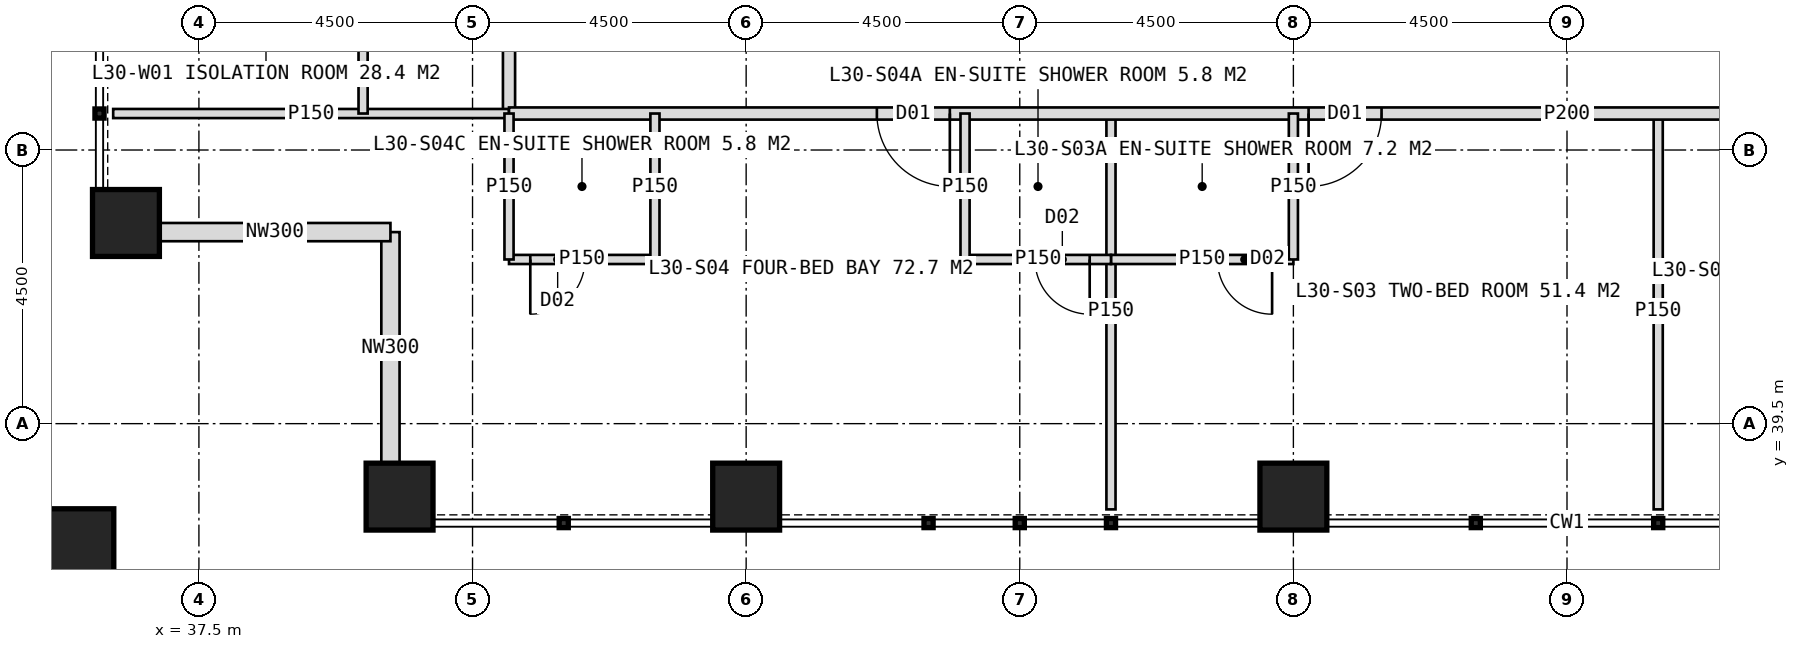
"""IFC4 building model, lengths in metres.
Left out: names, types, materials, properties, quantities, classifications, styles, units other than length and angle.
Written with IfcOpenShell. Run it as: python <this file> out.ifc"""

import sys

from ifc_helpers import new_model, si_unit, direction, frame, frame_2d, origin, origin_2d, place, context, subcontext, project, spatial, rectangle, hollow_rectangle, extrude, element, fill, save


model = new_model("IFC4")
c1 = context("Model", 3, precision=1e-05, world=origin(), true_north=direction((0.0, 1.0)))
c2 = subcontext(c1, "Body", "Model", "MODEL_VIEW")
j1 = project(units=[si_unit("LENGTHUNIT", "METRE"), si_unit("PLANEANGLEUNIT", "RADIAN")], contexts=[c1])
p1 = place(None, origin())
s1 = spatial("IfcSite", under=j1, at=p1, CompositionType="ELEMENT")
p2 = place(p1, origin())
s2 = spatial("IfcBuilding", under=s1, at=p2, CompositionType="ELEMENT")
p3 = place(p2, frame((0.0, 0.0, 128.0)))
s3 = spatial("IfcBuildingStorey", under=s2, at=p3, CompositionType="ELEMENT", Elevation=128.0)
for number, where, z_axis, x_axis in (
    (1, (40.8, 38.3, 0.0), (0.0, 0.0, 1.0), (1.0, 0.0, 0.0)),
    (2, (36.3, 42.8, 0.0), (0.0, 0.0, 1.0), (1.0, 0.0, 0.0)),
    (3, (46.5, 38.3, 0.0), (0.0, 0.0, 1.0), (1.0, 0.0, 0.0)),
    (4, (55.5, 38.3, 0.0), (0.0, 0.0, 1.0), (1.0, 0.0, 0.0)),
):
    element("IfcColumn", number, at=place(p3, frame(where, z_axis=z_axis, x_axis=x_axis)), inside=s3, PredefinedType="COLUMN", context=c2, shape_type="SweptSolid", body=[
        extrude(hollow_rectangle(XDim=1.1, YDim=1.1, WallThickness=0.1, at=origin_2d()), origin(), (0.0, 0.0, 1.0), 4.0),
    ])
p4 = place(p3, frame((35.4, 37.4, 0.0), z_axis=(0.0, 0.0, 1.0), x_axis=(1.0, 0.0, 0.0)))
e5 = element("IfcColumn", 5, at=p4, inside=s3, PredefinedType="COLUMN", context=c2, shape_type="SweptSolid", body=[
    extrude(hollow_rectangle(XDim=1.4, YDim=1.4, WallThickness=0.08, at=origin_2d()), origin(), (0.0, 0.0, 1.0), 4.0),
])
for number, where, z_axis, x_axis in (
    (6, (40.65, 38.85, 0.0), (0.0, 0.0, 1.0), (0.0, 1.0, 0.0)),
    (7, (40.65, 42.65, 0.0), (0.0, 0.0, 1.0), (-1.0, 0.0, 0.0)),
):
    element("IfcWall", number, at=place(p3, frame(where, z_axis=z_axis, x_axis=x_axis)), inside=s3, PredefinedType="ELEMENTEDWALL", context=c2, shape_type="SweptSolid", body=[
        extrude(rectangle(XDim=3.8, YDim=0.3, at=frame_2d((1.9, 0.0))), origin(), (0.0, 0.0, 1.0), 4.0),
    ])
p5 = place(p3, frame((42.6, 44.6, 0.0), z_axis=(0.0, 0.0, 1.0), x_axis=(0.0, 1.0, 0.0)))
e8 = element("IfcWall", 8, at=p5, inside=s3, PredefinedType="PARTITIONING", context=c2, shape_type="SweptSolid", body=[
    extrude(rectangle(XDim=34.8, YDim=0.2, at=frame_2d((17.4, 0.0))), origin(), (0.0, 0.0, 1.0), 3.75),
])
p6 = place(p5, frame((2.45, 0.0, 0.0)))
e9 = element("IfcOpeningElement", 9, at=p6, cuts=e8, PredefinedType="OPENING", context=c2, shape_type="SweptSolid", body=[
    extrude(rectangle(XDim=1.2, YDim=2.2, at=frame_2d((0.6, 1.1))), frame((0.0, 0.11, 0.0), z_axis=(0.0, -1.0, 0.0), x_axis=(1.0, 0.0, 0.0)), (0.0, 0.0, 1.0), 0.22),
])
p7 = place(p5, frame((10.15, 0.0, 0.0)))
e10 = element("IfcOpeningElement", 10, at=p7, cuts=e8, PredefinedType="OPENING", context=c2, shape_type="SweptSolid", body=[
    extrude(rectangle(XDim=1.2, YDim=2.2, at=frame_2d((0.6, 1.1))), frame((0.0, 0.11, 0.0), z_axis=(0.0, -1.0, 0.0), x_axis=(1.0, 0.0, 0.0)), (0.0, 0.0, 1.0), 0.22),
])
p8 = place(p5, frame((23.45, 0.0, 0.0)))
e11 = element("IfcOpeningElement", 11, at=p8, cuts=e8, PredefinedType="OPENING", context=c2, shape_type="SweptSolid", body=[
    extrude(rectangle(XDim=1.2, YDim=2.2, at=frame_2d((0.6, 1.1))), frame((0.0, 0.11, 0.0), z_axis=(0.0, -1.0, 0.0), x_axis=(1.0, 0.0, 0.0)), (0.0, 0.0, 1.0), 0.22),
])
p9 = place(p5, frame((30.55, 0.0, 0.0)))
e12 = element("IfcOpeningElement", 12, at=p9, cuts=e8, PredefinedType="OPENING", context=c2, shape_type="SweptSolid", body=[
    extrude(rectangle(XDim=1.2, YDim=2.2, at=frame_2d((0.6, 1.1))), frame((0.0, 0.11, 0.0), z_axis=(0.0, -1.0, 0.0), x_axis=(1.0, 0.0, 0.0)), (0.0, 0.0, 1.0), 0.22),
])
p10 = place(p3, frame((42.6, 44.6, 0.0), z_axis=(0.0, 0.0, 1.0), x_axis=(-1.0, 0.0, 0.0)))
e13 = element("IfcWall", 13, at=p10, inside=s3, PredefinedType="PARTITIONING", context=c2, shape_type="SweptSolid", body=[
    extrude(rectangle(XDim=6.51, YDim=0.15, at=frame_2d((3.255, 0.0))), origin(), (0.0, 0.0, 1.0), 3.75),
])
p11 = place(p3, frame((40.2, 44.6, 0.0), z_axis=(0.0, 0.0, 1.0), x_axis=(0.0, 1.0, 0.0)))
e14 = element("IfcWall", 14, at=p11, inside=s3, PredefinedType="PARTITIONING", context=c2, shape_type="SweptSolid", body=[
    extrude(rectangle(XDim=3.9, YDim=0.15, at=frame_2d((1.95, 0.0))), origin(), (0.0, 0.0, 1.0), 3.75),
])
p12 = place(p11, frame((2.45, 0.0, 0.0)))
e15 = element("IfcOpeningElement", 15, at=p12, cuts=e14, PredefinedType="OPENING", context=c2, shape_type="SweptSolid", body=[
    extrude(rectangle(XDim=1.2, YDim=2.2, at=frame_2d((0.6, 1.1))), frame((0.0, 0.085, 0.0), z_axis=(0.0, -1.0, 0.0), x_axis=(1.0, 0.0, 0.0)), (0.0, 0.0, 1.0), 0.17),
])
for number, where, z_axis, x_axis in (
    (16, (61.5, 44.6, 0.0), (0.0, 0.0, 1.0), (0.0, -1.0, 0.0)),
    (17, (52.5, 44.6, 0.0), (0.0, 0.0, 1.0), (0.0, -1.0, 0.0)),
):
    element("IfcWall", number, at=place(p3, frame(where, z_axis=z_axis, x_axis=x_axis)), inside=s3, PredefinedType="PARTITIONING", context=c2, shape_type="SweptSolid", body=[
        extrude(rectangle(XDim=6.51, YDim=0.15, at=frame_2d((3.255, 0.0))), origin(), (0.0, 0.0, 1.0), 3.75),
    ])
p13 = place(p3, frame((77.4, 44.6, 0.0), z_axis=(0.0, 0.0, 1.0), x_axis=(-1.0, 0.0, 0.0)))
e18 = element("IfcWall", 18, at=p13, inside=s3, PredefinedType="PARTITIONING", context=c2, shape_type="SweptSolid", body=[
    extrude(rectangle(XDim=34.8, YDim=0.2, at=frame_2d((17.4, 0.0))), origin(), (0.0, 0.0, 1.0), 3.75),
])
p14 = place(p13, frame((2.45, 0.0, 0.0)))
e19 = element("IfcOpeningElement", 19, at=p14, cuts=e18, PredefinedType="OPENING", context=c2, shape_type="SweptSolid", body=[
    extrude(rectangle(XDim=1.2, YDim=2.2, at=frame_2d((0.6, 1.1))), frame((0.0, 0.11, 0.0), z_axis=(0.0, -1.0, 0.0), x_axis=(1.0, 0.0, 0.0)), (0.0, 0.0, 1.0), 0.22),
])
p15 = place(p13, frame((10.15, 0.0, 0.0)))
e20 = element("IfcOpeningElement", 20, at=p15, cuts=e18, PredefinedType="OPENING", context=c2, shape_type="SweptSolid", body=[
    extrude(rectangle(XDim=1.2, YDim=2.2, at=frame_2d((0.6, 1.1))), frame((0.0, 0.11, 0.0), z_axis=(0.0, -1.0, 0.0), x_axis=(1.0, 0.0, 0.0)), (0.0, 0.0, 1.0), 0.22),
])
p16 = place(p13, frame((20.45, 0.0, 0.0)))
e21 = element("IfcOpeningElement", 21, at=p16, cuts=e18, PredefinedType="OPENING", context=c2, shape_type="SweptSolid", body=[
    extrude(rectangle(XDim=1.2, YDim=2.2, at=frame_2d((0.6, 1.1))), frame((0.0, 0.11, 0.0), z_axis=(0.0, -1.0, 0.0), x_axis=(1.0, 0.0, 0.0)), (0.0, 0.0, 1.0), 0.22),
])
p17 = place(p13, frame((27.55, 0.0, 0.0)))
e22 = element("IfcOpeningElement", 22, at=p17, cuts=e18, PredefinedType="OPENING", context=c2, shape_type="SweptSolid", body=[
    extrude(rectangle(XDim=1.2, YDim=2.2, at=frame_2d((0.6, 1.1))), frame((0.0, 0.11, 0.0), z_axis=(0.0, -1.0, 0.0), x_axis=(1.0, 0.0, 0.0)), (0.0, 0.0, 1.0), 0.22),
])
p18 = place(p3, frame((55.5, 42.2, 0.0), z_axis=(0.0, 0.0, 1.0), x_axis=(-1.0, 0.0, 0.0)))
e23 = element("IfcWall", 23, at=p18, inside=s3, PredefinedType="PARTITIONING", context=c2, shape_type="SweptSolid", body=[
    extrude(rectangle(XDim=3.0, YDim=0.15, at=frame_2d((1.5, 0.0))), origin(), (0.0, 0.0, 1.0), 3.75),
])
p19 = place(p18, frame((0.35, 0.0, 0.0)))
e24 = element("IfcOpeningElement", 24, at=p19, cuts=e23, PredefinedType="OPENING", context=c2, shape_type="SweptSolid", body=[
    extrude(rectangle(XDim=0.9, YDim=2.1, at=frame_2d((0.45, 1.05))), frame((0.0, 0.085, 0.0), z_axis=(0.0, -1.0, 0.0), x_axis=(1.0, 0.0, 0.0)), (0.0, 0.0, 1.0), 0.17),
])
p20 = place(p3, frame((55.5, 44.6, 0.0), z_axis=(0.0, 0.0, 1.0), x_axis=(0.0, -1.0, 0.0)))
e25 = element("IfcWall", 25, at=p20, inside=s3, PredefinedType="PARTITIONING", context=c2, shape_type="SweptSolid", body=[
    extrude(rectangle(XDim=2.4, YDim=0.15, at=frame_2d((1.2, 0.0))), origin(), (0.0, 0.0, 1.0), 2.95),
])
p21 = place(p3, frame((52.5, 42.2, 0.0), z_axis=(0.0, 0.0, 1.0), x_axis=(-1.0, 0.0, 0.0)))
e26 = element("IfcWall", 26, at=p21, inside=s3, PredefinedType="PARTITIONING", context=c2, shape_type="SweptSolid", body=[
    extrude(rectangle(XDim=2.4, YDim=0.15, at=frame_2d((1.2, 0.0))), origin(), (0.0, 0.0, 1.0), 3.75),
])
p22 = place(p21, frame((0.35, 0.0, 0.0)))
e27 = element("IfcOpeningElement", 27, at=p22, cuts=e26, PredefinedType="OPENING", context=c2, shape_type="SweptSolid", body=[
    extrude(rectangle(XDim=0.9, YDim=2.1, at=frame_2d((0.45, 1.05))), frame((0.0, 0.085, 0.0), z_axis=(0.0, -1.0, 0.0), x_axis=(1.0, 0.0, 0.0)), (0.0, 0.0, 1.0), 0.17),
])
p23 = place(p3, frame((50.1, 44.6, 0.0), z_axis=(0.0, 0.0, 1.0), x_axis=(0.0, -1.0, 0.0)))
e28 = element("IfcWall", 28, at=p23, inside=s3, PredefinedType="PARTITIONING", context=c2, shape_type="SweptSolid", body=[
    extrude(rectangle(XDim=2.4, YDim=0.15, at=frame_2d((1.2, 0.0))), origin(), (0.0, 0.0, 1.0), 3.75),
])
p24 = place(p3, frame((45.0, 42.2, 0.0), z_axis=(0.0, 0.0, 1.0), x_axis=(-1.0, 0.0, 0.0)))
e29 = element("IfcWall", 29, at=p24, inside=s3, PredefinedType="PARTITIONING", context=c2, shape_type="SweptSolid", body=[
    extrude(rectangle(XDim=2.4, YDim=0.15, at=frame_2d((1.2, 0.0))), origin(), (0.0, 0.0, 1.0), 3.75),
])
p25 = place(p24, frame((1.15, 0.0, 0.0)))
e30 = element("IfcOpeningElement", 30, at=p25, cuts=e29, PredefinedType="OPENING", context=c2, shape_type="SweptSolid", body=[
    extrude(rectangle(XDim=0.9, YDim=2.1, at=frame_2d((0.45, 1.05))), frame((0.0, 0.085, 0.0), z_axis=(0.0, -1.0, 0.0), x_axis=(1.0, 0.0, 0.0)), (0.0, 0.0, 1.0), 0.17),
])
for number, where, z_axis, x_axis in (
    (31, (45.0, 44.6, 0.0), (0.0, 0.0, 1.0), (0.0, -1.0, 0.0)),
    (32, (42.6, 44.6, 0.0), (0.0, 0.0, 1.0), (0.0, -1.0, 0.0)),
):
    element("IfcWall", number, at=place(p3, frame(where, z_axis=z_axis, x_axis=x_axis)), inside=s3, PredefinedType="PARTITIONING", context=c2, shape_type="SweptSolid", body=[
        extrude(rectangle(XDim=2.4, YDim=0.15, at=frame_2d((1.2, 0.0))), origin(), (0.0, 0.0, 1.0), 3.75),
    ])
p26 = place(p16, origin())
e33 = element("IfcDoor", 33, at=p26, inside=s3, OperationType="SINGLE_SWING_RIGHT", PredefinedType="DOOR", context=c2, shape_type="SweptSolid", body=[
    extrude(rectangle(XDim=1.2, YDim=2.2, at=frame_2d((0.6, 1.1))), frame((0.0, 0.025, 0.0), z_axis=(0.0, -1.0, 0.0), x_axis=(1.0, 0.0, 0.0)), (0.0, 0.0, 1.0), 0.05),
])
fill(e21, e33)
p27 = place(p19, origin())
e34 = element("IfcDoor", 34, at=p27, inside=s3, OperationType="SINGLE_SWING_LEFT", PredefinedType="DOOR", context=c2, shape_type="SweptSolid", body=[
    extrude(rectangle(XDim=0.9, YDim=2.1, at=frame_2d((0.45, 1.05))), frame((0.0, 0.025, 0.0), z_axis=(0.0, -1.0, 0.0), x_axis=(1.0, 0.0, 0.0)), (0.0, 0.0, 1.0), 0.05),
])
fill(e24, e34)
p28 = place(p17, origin())
e35 = element("IfcDoor", 35, at=p28, inside=s3, OperationType="SINGLE_SWING_LEFT", PredefinedType="DOOR", context=c2, shape_type="SweptSolid", body=[
    extrude(rectangle(XDim=1.2, YDim=2.2, at=frame_2d((0.6, 1.1))), frame((0.0, 0.025, 0.0), z_axis=(0.0, -1.0, 0.0), x_axis=(1.0, 0.0, 0.0)), (0.0, 0.0, 1.0), 0.05),
])
fill(e22, e35)
p29 = place(p22, origin())
e36 = element("IfcDoor", 36, at=p29, inside=s3, OperationType="SINGLE_SWING_LEFT", PredefinedType="DOOR", context=c2, shape_type="SweptSolid", body=[
    extrude(rectangle(XDim=0.9, YDim=2.1, at=frame_2d((0.45, 1.05))), frame((0.0, 0.025, 0.0), z_axis=(0.0, -1.0, 0.0), x_axis=(1.0, 0.0, 0.0)), (0.0, 0.0, 1.0), 0.05),
])
fill(e27, e36)
p30 = place(p25, origin())
e37 = element("IfcDoor", 37, at=p30, inside=s3, OperationType="SINGLE_SWING_RIGHT", PredefinedType="DOOR", context=c2, shape_type="SweptSolid", body=[
    extrude(rectangle(XDim=0.9, YDim=2.1, at=frame_2d((0.45, 1.05))), frame((0.0, 0.025, 0.0), z_axis=(0.0, -1.0, 0.0), x_axis=(1.0, 0.0, 0.0)), (0.0, 0.0, 1.0), 0.05),
])
fill(e30, e37)
save(model, sys.argv[1])
